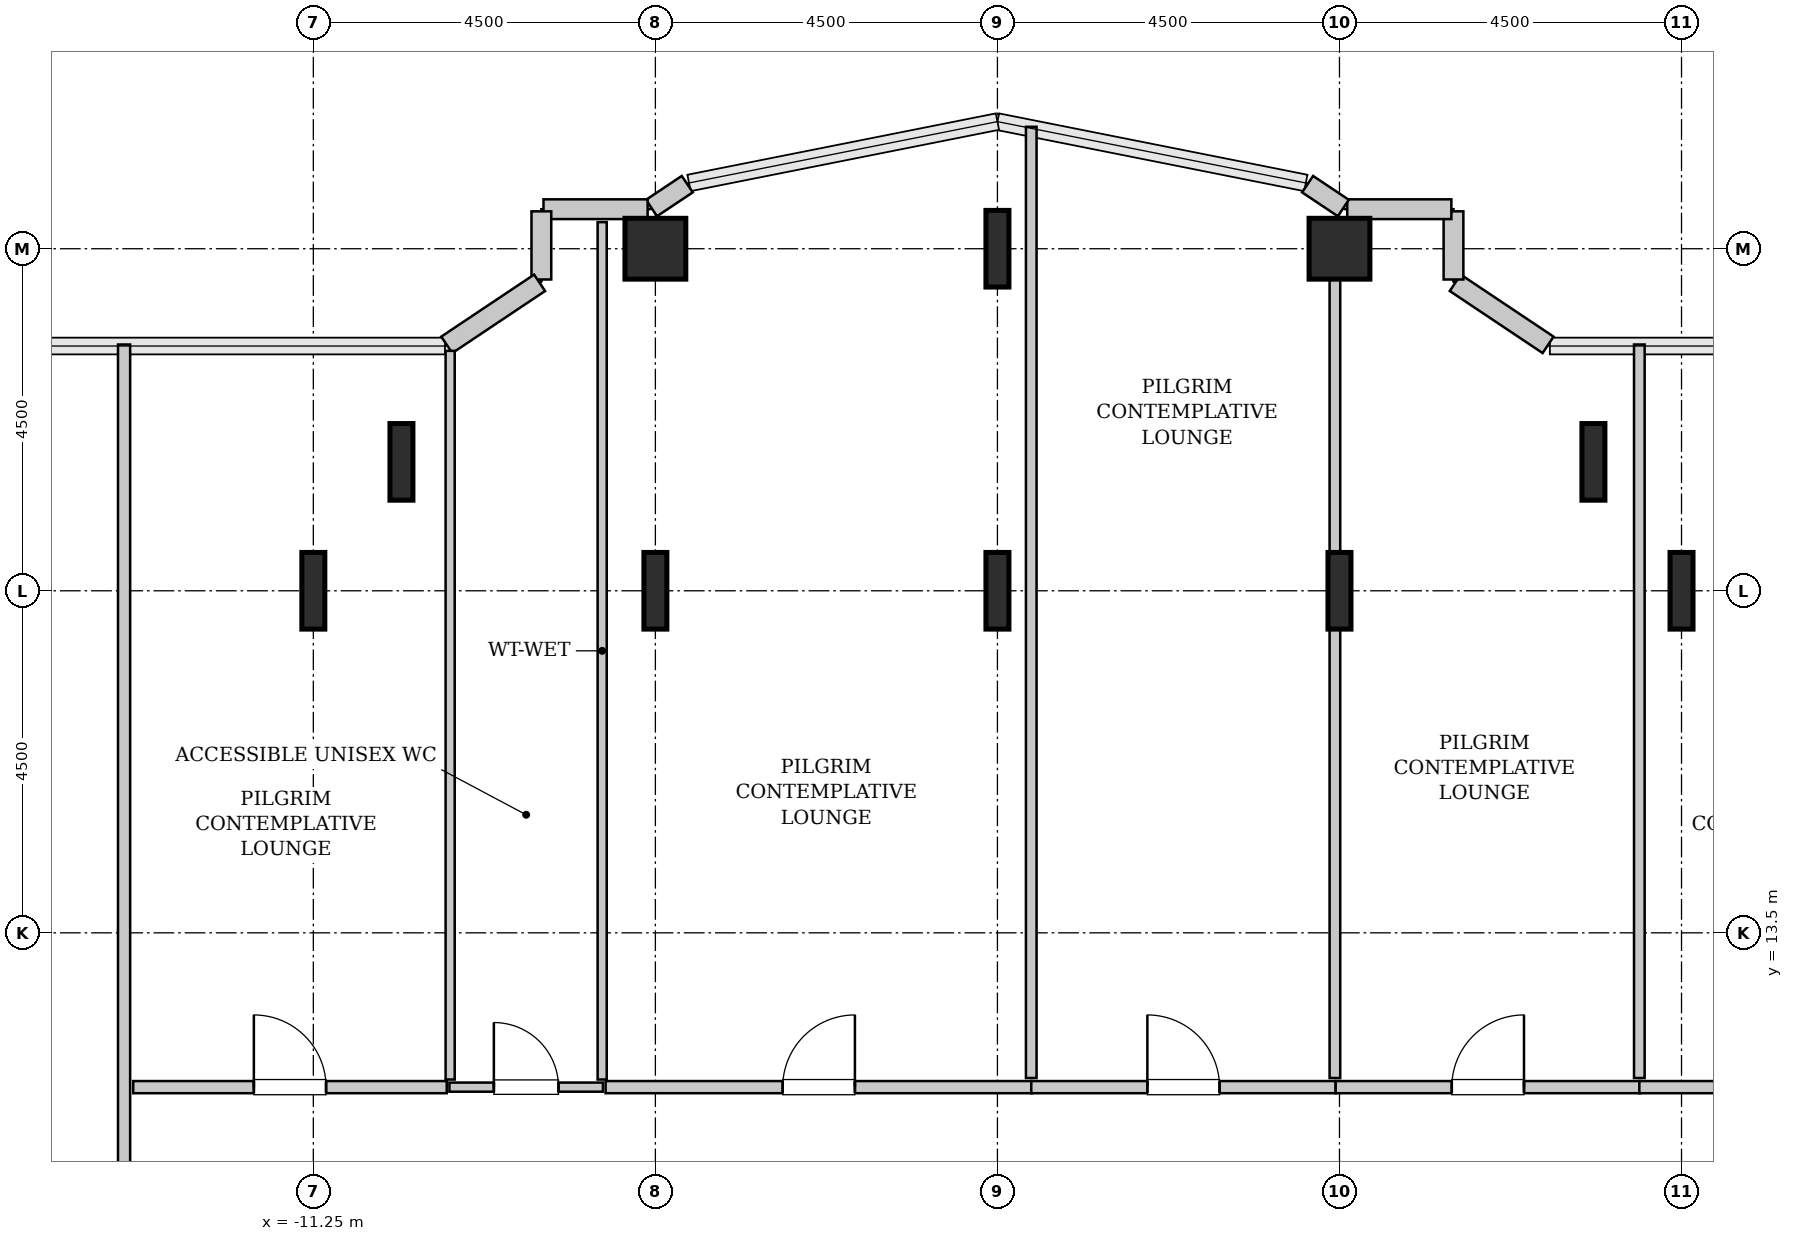
"""IFC4 building model, lengths in metres.
Left out: names, types, materials, properties, quantities, classifications, styles, units other than length and angle.
Written with IfcOpenShell. Run it as: python <this file> out.ifc"""

import sys

from ifc_helpers import new_model, si_unit, direction, frame, frame_2d, origin, origin_2d, place, context, subcontext, project, spatial, rectangle, hollow_rectangle, i_section, extrude, source, transform, mapped, element, fill, save


model = new_model("IFC4")
c1 = context("Model", 3, precision=1e-05, world=origin(), true_north=direction((0.0, 1.0)))
c2 = subcontext(c1, "Body", "Model", "MODEL_VIEW")
j1 = project(units=[si_unit("LENGTHUNIT", "METRE"), si_unit("PLANEANGLEUNIT", "RADIAN")], contexts=[c1])
p1 = place(None, origin())
s1 = spatial("IfcSite", under=j1, at=p1, CompositionType="ELEMENT")
p2 = place(p1, origin())
s2 = spatial("IfcBuilding", under=s1, at=p2, CompositionType="ELEMENT")
p3 = place(p2, frame((0.0, 0.0, 117.4)))
s3 = spatial("IfcBuildingStorey", under=s2, at=p3, CompositionType="ELEMENT", Elevation=117.4)
m1 = source(origin(), c2, "Body", "SweptSolid", [
    extrude(i_section(OverallWidth=0.302, OverallDepth=1.008, WebThickness=0.021, FlangeThickness=0.04, FilletRadius=0.03, at=origin_2d()), origin(), (0.0, 0.0, 1.0), 3.8),
])
for number, where, z_axis, x_axis in (
    (1, (-11.25, 18.0, 0.0), (0.0, 0.0, 1.0), (1.0, 0.0, 0.0)),
    (2, (-10.091, 19.696, 0.0), (0.0, 0.0, 1.0), (1.0, 0.0, 0.0)),
    (3, (-6.75, 18.0, 0.0), (0.0, 0.0, 1.0), (1.0, 0.0, 0.0)),
):
    element("IfcColumn", number, at=place(p3, frame(where, z_axis=z_axis, x_axis=x_axis)), inside=s3, PredefinedType="COLUMN", context=c2, shape_type="MappedRepresentation", body=[
        mapped(m1, transform((0.0, 0.0, 0.0), x_axis=(1.0, 0.0, 0.0), y_axis=(0.0, 1.0, 0.0), z_axis=(0.0, 0.0, 1.0), scale=1.0)),
    ])
m2 = source(origin(), c2, "Body", "SweptSolid", [
    extrude(hollow_rectangle(XDim=0.8, YDim=0.8, WallThickness=0.04, InnerFilletRadius=0.04, OuterFilletRadius=0.08, at=origin_2d()), origin(), (0.0, 0.0, 1.0), 3.8),
])
p4 = place(p3, frame((-6.75, 22.5, 0.0), z_axis=(0.0, 0.0, 1.0), x_axis=(1.0, 0.0, 0.0)))
e4 = element("IfcColumn", 4, at=p4, inside=s3, PredefinedType="COLUMN", context=c2, shape_type="MappedRepresentation", body=[
    mapped(m2, transform((0.0, 0.0, 0.0), x_axis=(1.0, 0.0, 0.0), y_axis=(0.0, 1.0, 0.0), z_axis=(0.0, 0.0, 1.0), scale=1.0)),
])
for number, where, z_axis, x_axis in (
    (5, (-2.25, 18.0, 0.0), (0.0, 0.0, 1.0), (1.0, 0.0, 0.0)),
    (6, (-2.25, 22.5, 0.0), (0.0, 0.0, 1.0), (1.0, 0.0, 0.0)),
    (7, (2.25, 18.0, 0.0), (0.0, 0.0, 1.0), (1.0, 0.0, 0.0)),
):
    element("IfcColumn", number, at=place(p3, frame(where, z_axis=z_axis, x_axis=x_axis)), inside=s3, PredefinedType="COLUMN", context=c2, shape_type="MappedRepresentation", body=[
        mapped(m1, transform((0.0, 0.0, 0.0), x_axis=(1.0, 0.0, 0.0), y_axis=(0.0, 1.0, 0.0), z_axis=(0.0, 0.0, 1.0), scale=1.0)),
    ])
p5 = place(p3, frame((2.25, 22.5, 0.0), z_axis=(0.0, 0.0, 1.0), x_axis=(1.0, 0.0, 0.0)))
e8 = element("IfcColumn", 8, at=p5, inside=s3, PredefinedType="COLUMN", context=c2, shape_type="MappedRepresentation", body=[
    mapped(m2, transform((0.0, 0.0, 0.0), x_axis=(1.0, 0.0, 0.0), y_axis=(0.0, 1.0, 0.0), z_axis=(0.0, 0.0, 1.0), scale=1.0)),
])
for number, where, z_axis, x_axis in (
    (9, (5.591, 19.696, 0.0), (0.0, 0.0, 1.0), (1.0, 0.0, 0.0)),
    (10, (6.75, 18.0, 0.0), (0.0, 0.0, 1.0), (1.0, 0.0, 0.0)),
):
    element("IfcColumn", number, at=place(p3, frame(where, z_axis=z_axis, x_axis=x_axis)), inside=s3, PredefinedType="COLUMN", context=c2, shape_type="MappedRepresentation", body=[
        mapped(m1, transform((0.0, 0.0, 0.0), x_axis=(1.0, 0.0, 0.0), y_axis=(0.0, 1.0, 0.0), z_axis=(0.0, 0.0, 1.0), scale=1.0)),
    ])
m3 = source(origin(), c2, "Body", "SweptSolid", [
    extrude(rectangle(XDim=1.469, YDim=0.26, at=frame_2d((0.734, 0.0))), origin(), (0.0, 0.0, 1.0), 3.55),
])
p6 = place(p3, frame((4.995, 21.236, 0.0), z_axis=(0.0, 0.0, 1.0), x_axis=(-0.831461760506, 0.555581983884, 0.0)))
e11 = element("IfcWall", 11, at=p6, inside=s3, PredefinedType="SOLIDWALL", context=c2, shape_type="MappedRepresentation", body=[
    mapped(m3, transform((0.0, 0.0, 0.0), x_axis=(1.0, 0.0, 0.0), y_axis=(0.0, 1.0, 0.0), z_axis=(0.0, 0.0, 1.0), scale=1.0)),
])
m4 = source(origin(), c2, "Body", "SweptSolid", [
    extrude(rectangle(XDim=0.897, YDim=0.26, at=frame_2d((0.448, 0.0))), origin(), (0.0, 0.0, 1.0), 3.55),
])
p7 = place(p3, frame((3.75, 22.095, 0.0), z_axis=(0.0, 0.0, 1.0), x_axis=(0.0, 1.0, 0.0)))
e12 = element("IfcWall", 12, at=p7, inside=s3, PredefinedType="SOLIDWALL", context=c2, shape_type="MappedRepresentation", body=[
    mapped(m4, transform((0.0, 0.0, 0.0), x_axis=(1.0, 0.0, 0.0), y_axis=(0.0, 1.0, 0.0), z_axis=(0.0, 0.0, 1.0), scale=1.0)),
])
m5 = source(origin(), c2, "Body", "SweptSolid", [
    extrude(rectangle(XDim=1.37, YDim=0.26, at=frame_2d((0.685, 0.0))), origin(), (0.0, 0.0, 1.0), 3.55),
])
p8 = place(p3, frame((3.722, 23.02, 0.0), z_axis=(0.0, 0.0, 1.0), x_axis=(-1.0, 0.0, 0.0)))
e13 = element("IfcWall", 13, at=p8, inside=s3, PredefinedType="SOLIDWALL", context=c2, shape_type="MappedRepresentation", body=[
    mapped(m5, transform((0.0, 0.0, 0.0), x_axis=(1.0, 0.0, 0.0), y_axis=(0.0, 1.0, 0.0), z_axis=(0.0, 0.0, 1.0), scale=1.0)),
])
m6 = source(origin(), c2, "Body", "SweptSolid", [
    extrude(rectangle(XDim=0.565, YDim=0.26, at=frame_2d((0.283, 0.0))), origin(), (0.0, 0.0, 1.0), 3.55),
])
for number, where, z_axis, x_axis in (
    (14, (2.301, 23.036, 0.0), (0.0, 0.0, 1.0), (-0.832, 0.555, 0.0)),
    (15, (-6.331, 23.35, 0.0), (0.0, 0.0, 1.0), (-0.832, -0.555, 0.0)),
):
    element("IfcWall", number, at=place(p3, frame(where, z_axis=z_axis, x_axis=x_axis)), inside=s3, PredefinedType="SOLIDWALL", context=c2, shape_type="MappedRepresentation", body=[
        mapped(m6, transform((0.0, 0.0, 0.0), x_axis=(1.0, 0.0, 0.0), y_axis=(0.0, 1.0, 0.0), z_axis=(0.0, 0.0, 1.0), scale=1.0)),
    ])
p9 = place(p3, frame((-6.852, 23.02, 0.0), z_axis=(0.0, 0.0, 1.0), x_axis=(-1.0, 0.0, 0.0)))
e16 = element("IfcWall", 16, at=p9, inside=s3, PredefinedType="SOLIDWALL", context=c2, shape_type="MappedRepresentation", body=[
    mapped(m5, transform((0.0, 0.0, 0.0), x_axis=(1.0, 0.0, 0.0), y_axis=(0.0, 1.0, 0.0), z_axis=(0.0, 0.0, 1.0), scale=1.0)),
])
p10 = place(p3, frame((-8.25, 22.992, 0.0), z_axis=(0.0, 0.0, 1.0), x_axis=(0.0, -1.0, 0.0)))
e17 = element("IfcWall", 17, at=p10, inside=s3, PredefinedType="SOLIDWALL", context=c2, shape_type="MappedRepresentation", body=[
    mapped(m4, transform((0.0, 0.0, 0.0), x_axis=(1.0, 0.0, 0.0), y_axis=(0.0, 1.0, 0.0), z_axis=(0.0, 0.0, 1.0), scale=1.0)),
])
p11 = place(p3, frame((-8.273, 22.052, 0.0), z_axis=(0.0, 0.0, 1.0), x_axis=(-0.831461760506, -0.555581983884, 0.0)))
e18 = element("IfcWall", 18, at=p11, inside=s3, PredefinedType="SOLIDWALL", context=c2, shape_type="MappedRepresentation", body=[
    mapped(m3, transform((0.0, 0.0, 0.0), x_axis=(1.0, 0.0, 0.0), y_axis=(0.0, 1.0, 0.0), z_axis=(0.0, 0.0, 1.0), scale=1.0)),
])
m7 = source(origin(), c2, "Body", "SweptSolid", [
    extrude(rectangle(XDim=2.02, YDim=0.12, at=frame_2d((1.01, 0.0))), origin(), (0.0, 0.0, 1.0), 3.535),
])
p12 = place(p3, frame((-9.46, 11.47, 0.0), z_axis=(0.0, 0.0, 1.0), x_axis=(1.0, 0.0, 0.0)))
e19 = element("IfcWall", 19, at=p12, inside=s3, PredefinedType="PLUMBINGWALL", context=c2, shape_type="MappedRepresentation", body=[
    mapped(m7, transform((0.0, 0.0, 0.0), x_axis=(1.0, 0.0, 0.0), y_axis=(0.0, 1.0, 0.0), z_axis=(0.0, 0.0, 1.0), scale=1.0)),
])
p13 = place(p12, frame((0.585, 0.0, 0.0)))
e20 = element("IfcOpeningElement", 20, at=p13, cuts=e19, PredefinedType="OPENING", context=c2, shape_type="SweptSolid", body=[
    extrude(rectangle(XDim=0.85, YDim=2.1, at=frame_2d((0.425, 1.05))), frame((0.0, 0.07, 0.0), z_axis=(0.0, -1.0, 0.0), x_axis=(1.0, 0.0, 0.0)), (0.0, 0.0, 1.0), 0.14),
])
m8 = source(origin(), c2, "Body", "SweptSolid", [
    extrude(rectangle(XDim=11.28, YDim=0.12, at=frame_2d((5.64, 0.0))), origin(), (0.0, 0.0, 1.0), 3.535),
])
p14 = place(p3, frame((-7.45, 11.57, 0.0), z_axis=(0.0, 0.0, 1.0), x_axis=(0.0, 1.0, 0.0)))
e21 = element("IfcWall", 21, at=p14, inside=s3, PredefinedType="PLUMBINGWALL", context=c2, shape_type="MappedRepresentation", body=[
    mapped(m8, transform((0.0, 0.0, 0.0), x_axis=(1.0, 0.0, 0.0), y_axis=(0.0, 1.0, 0.0), z_axis=(0.0, 0.0, 1.0), scale=1.0)),
])
m9 = source(origin(), c2, "Body", "SweptSolid", [
    extrude(rectangle(XDim=9.587, YDim=0.12, at=frame_2d((4.793, 0.0))), origin(), (0.0, 0.0, 1.0), 3.535),
])
p15 = place(p3, frame((-9.45, 11.57, 0.0), z_axis=(0.0, 0.0, 1.0), x_axis=(0.0, 1.0, 0.0)))
e22 = element("IfcWall", 22, at=p15, inside=s3, PredefinedType="PLUMBINGWALL", context=c2, shape_type="MappedRepresentation", body=[
    mapped(m9, transform((0.0, 0.0, 0.0), x_axis=(1.0, 0.0, 0.0), y_axis=(0.0, 1.0, 0.0), z_axis=(0.0, 0.0, 1.0), scale=1.0)),
])
m10 = source(origin(), c2, "Body", "SweptSolid", [
    extrude(rectangle(XDim=12.745, YDim=0.16, at=frame_2d((6.373, 0.0))), origin(), (0.0, 0.0, 1.0), 3.535),
])
p16 = place(p3, frame((-13.74, 8.495, 0.0), z_axis=(0.0, 0.0, 1.0), x_axis=(0.0, 1.0, 0.0)))
e23 = element("IfcWall", 23, at=p16, inside=s3, PredefinedType="PARTITIONING", context=c2, shape_type="MappedRepresentation", body=[
    mapped(m10, transform((0.0, 0.0, 0.0), x_axis=(1.0, 0.0, 0.0), y_axis=(0.0, 1.0, 0.0), z_axis=(0.0, 0.0, 1.0), scale=1.0)),
])
p17 = place(p16, frame((1.032, 0.0, 0.0)))
e24 = element("IfcOpeningElement", 24, at=p17, cuts=e23, PredefinedType="OPENING", context=c2, shape_type="SweptSolid", body=[
    extrude(rectangle(XDim=0.95, YDim=2.1, at=frame_2d((0.475, 1.05))), frame((0.0, 0.09, 0.0), z_axis=(0.0, -1.0, 0.0), x_axis=(1.0, 0.0, 0.0)), (0.0, 0.0, 1.0), 0.18),
])
m11 = source(origin(), c2, "Body", "SweptSolid", [
    extrude(rectangle(XDim=4.125, YDim=0.16, at=frame_2d((2.062, 0.0))), origin(), (0.0, 0.0, 1.0), 3.535),
])
p18 = place(p3, frame((-13.62, 11.47, 0.0), z_axis=(0.0, 0.0, 1.0), x_axis=(1.0, 0.0, 0.0)))
e25 = element("IfcWall", 25, at=p18, inside=s3, PredefinedType="PARTITIONING", context=c2, shape_type="MappedRepresentation", body=[
    mapped(m11, transform((0.0, 0.0, 0.0), x_axis=(1.0, 0.0, 0.0), y_axis=(0.0, 1.0, 0.0), z_axis=(0.0, 0.0, 1.0), scale=1.0)),
])
p19 = place(p18, frame((1.587, 0.0, 0.0)))
e26 = element("IfcOpeningElement", 26, at=p19, cuts=e25, PredefinedType="OPENING", context=c2, shape_type="SweptSolid", body=[
    extrude(rectangle(XDim=0.95, YDim=2.1, at=frame_2d((0.475, 1.05))), frame((0.0, 0.09, 0.0), z_axis=(0.0, -1.0, 0.0), x_axis=(1.0, 0.0, 0.0)), (0.0, 0.0, 1.0), 0.18),
])
m12 = source(origin(), c2, "Body", "SweptSolid", [
    extrude(rectangle(XDim=5.61, YDim=0.16, at=frame_2d((2.805, 0.0))), origin(), (0.0, 0.0, 1.0), 3.535),
])
p20 = place(p3, frame((-7.405, 11.47, 0.0), z_axis=(0.0, 0.0, 1.0), x_axis=(1.0, 0.0, 0.0)))
e27 = element("IfcWall", 27, at=p20, inside=s3, PredefinedType="PARTITIONING", context=c2, shape_type="MappedRepresentation", body=[
    mapped(m12, transform((0.0, 0.0, 0.0), x_axis=(1.0, 0.0, 0.0), y_axis=(0.0, 1.0, 0.0), z_axis=(0.0, 0.0, 1.0), scale=1.0)),
])
p21 = place(p20, frame((2.33, 0.0, 0.0)))
e28 = element("IfcOpeningElement", 28, at=p21, cuts=e27, PredefinedType="OPENING", context=c2, shape_type="SweptSolid", body=[
    extrude(rectangle(XDim=0.95, YDim=2.1, at=frame_2d((0.475, 1.05))), frame((0.0, 0.09, 0.0), z_axis=(0.0, -1.0, 0.0), x_axis=(1.0, 0.0, 0.0)), (0.0, 0.0, 1.0), 0.18),
])
m13 = source(origin(), c2, "Body", "SweptSolid", [
    extrude(rectangle(XDim=12.514, YDim=0.14, at=frame_2d((6.257, 0.0))), origin(), (0.0, 0.0, 1.0), 2.875),
])
p22 = place(p3, frame((-1.805, 11.59, 0.0), z_axis=(0.0, 0.0, 1.0), x_axis=(0.0, 1.0, 0.0)))
e29 = element("IfcWall", 29, at=p22, inside=s3, PredefinedType="PARTITIONING", context=c2, shape_type="MappedRepresentation", body=[
    mapped(m13, transform((0.0, 0.0, 0.0), x_axis=(1.0, 0.0, 0.0), y_axis=(0.0, 1.0, 0.0), z_axis=(0.0, 0.0, 1.0), scale=1.0)),
])
m14 = source(origin(), c2, "Body", "SweptSolid", [
    extrude(rectangle(XDim=4.005, YDim=0.16, at=frame_2d((2.002, 0.0))), origin(), (0.0, 0.0, 1.0), 3.535),
])
p23 = place(p3, frame((-1.805, 11.47, 0.0), z_axis=(0.0, 0.0, 1.0), x_axis=(1.0, 0.0, 0.0)))
e30 = element("IfcWall", 30, at=p23, inside=s3, PredefinedType="PARTITIONING", context=c2, shape_type="MappedRepresentation", body=[
    mapped(m14, transform((0.0, 0.0, 0.0), x_axis=(1.0, 0.0, 0.0), y_axis=(0.0, 1.0, 0.0), z_axis=(0.0, 0.0, 1.0), scale=1.0)),
])
p24 = place(p23, frame((1.528, 0.0, 0.0)))
e31 = element("IfcOpeningElement", 31, at=p24, cuts=e30, PredefinedType="OPENING", context=c2, shape_type="SweptSolid", body=[
    extrude(rectangle(XDim=0.95, YDim=2.1, at=frame_2d((0.475, 1.05))), frame((0.0, 0.09, 0.0), z_axis=(0.0, -1.0, 0.0), x_axis=(1.0, 0.0, 0.0)), (0.0, 0.0, 1.0), 0.18),
])
m15 = source(origin(), c2, "Body", "SweptSolid", [
    extrude(rectangle(XDim=11.318, YDim=0.14, at=frame_2d((5.659, 0.0))), origin(), (0.0, 0.0, 1.0), 2.875),
])
p25 = place(p3, frame((2.19, 11.59, 0.0), z_axis=(0.0, 0.0, 1.0), x_axis=(0.0, 1.0, 0.0)))
e32 = element("IfcWall", 32, at=p25, inside=s3, PredefinedType="PARTITIONING", context=c2, shape_type="MappedRepresentation", body=[
    mapped(m15, transform((0.0, 0.0, 0.0), x_axis=(1.0, 0.0, 0.0), y_axis=(0.0, 1.0, 0.0), z_axis=(0.0, 0.0, 1.0), scale=1.0)),
])
m16 = source(origin(), c2, "Body", "SweptSolid", [
    extrude(rectangle(XDim=4.005, YDim=0.16, at=frame_2d((2.002, 0.0))), origin(), (0.0, 0.0, 1.0), 3.535),
])
p26 = place(p3, frame((2.2, 11.47, 0.0), z_axis=(0.0, 0.0, 1.0), x_axis=(1.0, 0.0, 0.0)))
e33 = element("IfcWall", 33, at=p26, inside=s3, PredefinedType="PARTITIONING", context=c2, shape_type="MappedRepresentation", body=[
    mapped(m16, transform((0.0, 0.0, 0.0), x_axis=(1.0, 0.0, 0.0), y_axis=(0.0, 1.0, 0.0), z_axis=(0.0, 0.0, 1.0), scale=1.0)),
])
p27 = place(p26, frame((1.528, 0.0, 0.0)))
e34 = element("IfcOpeningElement", 34, at=p27, cuts=e33, PredefinedType="OPENING", context=c2, shape_type="SweptSolid", body=[
    extrude(rectangle(XDim=0.95, YDim=2.1, at=frame_2d((0.475, 1.05))), frame((0.0, 0.09, 0.0), z_axis=(0.0, -1.0, 0.0), x_axis=(1.0, 0.0, 0.0)), (0.0, 0.0, 1.0), 0.18),
])
m17 = source(origin(), c2, "Body", "SweptSolid", [
    extrude(rectangle(XDim=9.65, YDim=0.14, at=frame_2d((4.825, 0.0))), origin(), (0.0, 0.0, 1.0), 3.535),
])
p28 = place(p3, frame((6.195, 11.59, 0.0), z_axis=(0.0, 0.0, 1.0), x_axis=(0.0, 1.0, 0.0)))
e35 = element("IfcWall", 35, at=p28, inside=s3, PredefinedType="PARTITIONING", context=c2, shape_type="MappedRepresentation", body=[
    mapped(m17, transform((0.0, 0.0, 0.0), x_axis=(1.0, 0.0, 0.0), y_axis=(0.0, 1.0, 0.0), z_axis=(0.0, 0.0, 1.0), scale=1.0)),
])
m18 = source(origin(), c2, "Body", "SweptSolid", [
    extrude(rectangle(XDim=3.765, YDim=0.16, at=frame_2d((1.882, 0.0))), origin(), (0.0, 0.0, 1.0), 3.535),
])
p29 = place(p3, frame((6.195, 11.47, 0.0), z_axis=(0.0, 0.0, 1.0), x_axis=(1.0, 0.0, 0.0)))
e36 = element("IfcWall", 36, at=p29, inside=s3, PredefinedType="PARTITIONING", context=c2, shape_type="MappedRepresentation", body=[
    mapped(m18, transform((0.0, 0.0, 0.0), x_axis=(1.0, 0.0, 0.0), y_axis=(0.0, 1.0, 0.0), z_axis=(0.0, 0.0, 1.0), scale=1.0)),
])
p30 = place(p29, frame((1.407, 0.0, 0.0)))
e37 = element("IfcOpeningElement", 37, at=p30, cuts=e36, PredefinedType="OPENING", context=c2, shape_type="SweptSolid", body=[
    extrude(rectangle(XDim=0.95, YDim=2.1, at=frame_2d((0.475, 1.05))), frame((0.0, 0.09, 0.0), z_axis=(0.0, -1.0, 0.0), x_axis=(1.0, 0.0, 0.0)), (0.0, 0.0, 1.0), 0.18),
])
m19 = source(origin(), c2, "Body", "SweptSolid", [
    extrude(rectangle(XDim=0.85, YDim=2.1, at=frame_2d((0.425, 1.05))), frame((0.0, 0.025, 0.0), z_axis=(0.0, -1.0, 0.0), x_axis=(1.0, 0.0, 0.0)), (0.0, 0.0, 1.0), 0.05),
])
p31 = place(p13, origin())
e38 = element("IfcDoor", 38, at=p31, inside=s3, OperationType="SINGLE_SWING_LEFT", PredefinedType="DOOR", context=c2, shape_type="MappedRepresentation", body=[
    mapped(m19, transform((0.0, 0.0, 0.0), x_axis=(1.0, 0.0, 0.0), y_axis=(0.0, 1.0, 0.0), z_axis=(0.0, 0.0, 1.0), scale=1.0)),
])
fill(e20, e38)
m20 = source(origin(), c2, "Body", "SweptSolid", [
    extrude(rectangle(XDim=0.95, YDim=2.1, at=frame_2d((0.475, 1.05))), frame((0.0, 0.025, 0.0), z_axis=(0.0, -1.0, 0.0), x_axis=(1.0, 0.0, 0.0)), (0.0, 0.0, 1.0), 0.05),
])
p32 = place(p19, origin())
e39 = element("IfcDoor", 39, at=p32, inside=s3, OperationType="SINGLE_SWING_LEFT", PredefinedType="DOOR", context=c2, shape_type="MappedRepresentation", body=[
    mapped(m20, transform((0.0, 0.0, 0.0), x_axis=(1.0, 0.0, 0.0), y_axis=(0.0, 1.0, 0.0), z_axis=(0.0, 0.0, 1.0), scale=1.0)),
])
fill(e26, e39)
p33 = place(p21, origin())
e40 = element("IfcDoor", 40, at=p33, inside=s3, OperationType="SINGLE_SWING_RIGHT", PredefinedType="DOOR", context=c2, shape_type="MappedRepresentation", body=[
    mapped(m20, transform((0.0, 0.0, 0.0), x_axis=(1.0, 0.0, 0.0), y_axis=(0.0, 1.0, 0.0), z_axis=(0.0, 0.0, 1.0), scale=1.0)),
])
fill(e28, e40)
p34 = place(p24, origin())
e41 = element("IfcDoor", 41, at=p34, inside=s3, OperationType="SINGLE_SWING_LEFT", PredefinedType="DOOR", context=c2, shape_type="MappedRepresentation", body=[
    mapped(m20, transform((0.0, 0.0, 0.0), x_axis=(1.0, 0.0, 0.0), y_axis=(0.0, 1.0, 0.0), z_axis=(0.0, 0.0, 1.0), scale=1.0)),
])
fill(e31, e41)
p35 = place(p27, origin())
e42 = element("IfcDoor", 42, at=p35, inside=s3, OperationType="SINGLE_SWING_RIGHT", PredefinedType="DOOR", context=c2, shape_type="MappedRepresentation", body=[
    mapped(m20, transform((0.0, 0.0, 0.0), x_axis=(1.0, 0.0, 0.0), y_axis=(0.0, 1.0, 0.0), z_axis=(0.0, 0.0, 1.0), scale=1.0)),
])
fill(e34, e42)
save(model, sys.argv[1])
